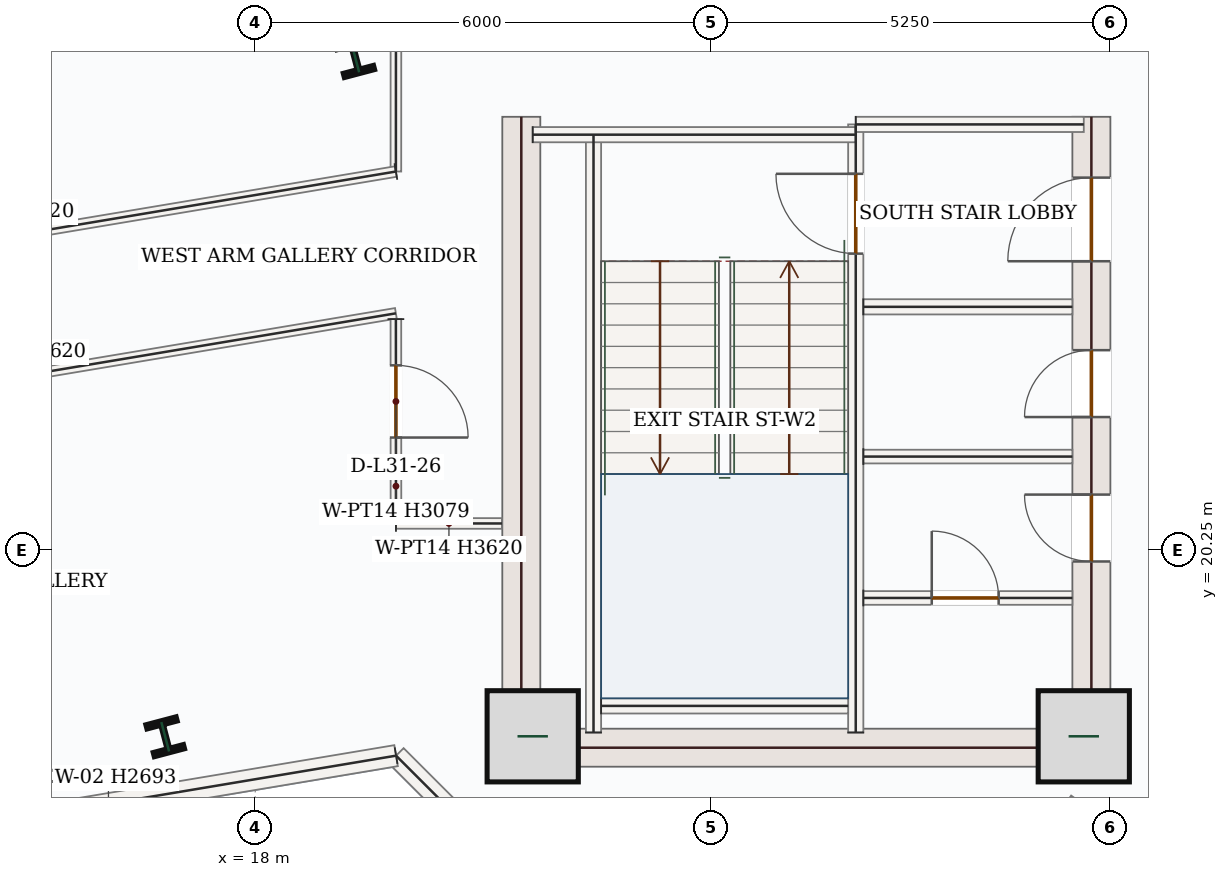
"""IFC4 building model, lengths in metres.
Left out: names, types, materials, properties, quantities, classifications, styles, units other than length and angle.
Written with IfcOpenShell. Run it as: python <this file> out.ifc"""

import sys

from ifc_helpers import new_model, si_unit, direction, frame, frame_2d, origin, origin_2d, place, context, subcontext, project, spatial, rectangle, i_section, extrude, source, transform, mapped, element, fill, save


model = new_model("IFC4")
c1 = context("Model", 3, precision=1e-05, world=origin(), true_north=direction((0.0, 1.0)))
c2 = subcontext(c1, "Body", "Model", "MODEL_VIEW")
j1 = project(units=[si_unit("LENGTHUNIT", "METRE"), si_unit("PLANEANGLEUNIT", "RADIAN")], contexts=[c1])
p1 = place(None, origin())
s1 = spatial("IfcSite", under=j1, at=p1, CompositionType="ELEMENT")
p2 = place(p1, origin())
s2 = spatial("IfcBuilding", under=s1, at=p2, CompositionType="ELEMENT")
p3 = place(p2, frame((0.0, 0.0, 139.5)))
s3 = spatial("IfcBuildingStorey", under=s2, at=p3, CompositionType="ELEMENT", Elevation=139.5)
m1 = source(origin(), c2, "Body", "SweptSolid", [
    extrude(rectangle(XDim=8.55, YDim=0.5, at=frame_2d((4.275, 0.0))), origin(), (0.0, 0.0, 1.0), 3.62),
])
p4 = place(p3, frame((21.5, 17.4, 0.0), z_axis=(0.0, 0.0, 1.0), x_axis=(0.0, 1.0, 0.0)))
e1 = element("IfcWall", 1, at=p4, inside=s3, PredefinedType="SHEAR", context=c2, shape_type="MappedRepresentation", body=[
    mapped(m1, transform((0.0, 0.0, 0.0), x_axis=(1.0, 0.0, 0.0), y_axis=(0.0, 1.0, 0.0), z_axis=(0.0, 0.0, 1.0), scale=1.0)),
])
p5 = place(p3, frame((29.0, 17.4, 0.0), z_axis=(0.0, 0.0, 1.0), x_axis=(0.0, 1.0, 0.0)))
e2 = element("IfcWall", 2, at=p5, inside=s3, PredefinedType="SHEAR", context=c2, shape_type="SweptSolid", body=[
    extrude(rectangle(XDim=8.55, YDim=0.5, at=frame_2d((4.275, 0.0))), origin(), (0.0, 0.0, 1.0), 3.62),
])
p6 = place(p5, frame((6.65, 0.0, 0.0)))
e3 = element("IfcOpeningElement", 3, at=p6, cuts=e2, PredefinedType="OPENING", context=c2, shape_type="SweptSolid", body=[
    extrude(rectangle(XDim=1.1, YDim=2.2, at=frame_2d((0.55, 1.1))), frame((0.0, 0.26, 0.0), z_axis=(0.0, -1.0, 0.0), x_axis=(1.0, 0.0, 0.0)), (0.0, 0.0, 1.0), 0.52),
])
p7 = place(p5, frame((2.7, 0.0, 0.0)))
e4 = element("IfcOpeningElement", 4, at=p7, cuts=e2, PredefinedType="OPENING", context=c2, shape_type="SweptSolid", body=[
    extrude(rectangle(XDim=0.88, YDim=2.1, at=frame_2d((0.44, 1.05))), frame((0.0, 0.26, 0.0), z_axis=(0.0, -1.0, 0.0), x_axis=(1.0, 0.0, 0.0)), (0.0, 0.0, 1.0), 0.52),
])
p8 = place(p5, frame((4.6, 0.0, 0.0)))
e5 = element("IfcOpeningElement", 5, at=p8, cuts=e2, PredefinedType="OPENING", context=c2, shape_type="SweptSolid", body=[
    extrude(rectangle(XDim=0.88, YDim=2.1, at=frame_2d((0.44, 1.05))), frame((0.0, 0.26, 0.0), z_axis=(0.0, -1.0, 0.0), x_axis=(1.0, 0.0, 0.0)), (0.0, 0.0, 1.0), 0.52),
])
m2 = source(origin(), c2, "Body", "SweptSolid", [
    extrude(rectangle(XDim=7.0, YDim=0.5, at=frame_2d((3.5, 0.0))), origin(), (0.0, 0.0, 1.0), 3.62),
])
p9 = place(p3, frame((21.75, 17.65, 0.0), z_axis=(0.0, 0.0, 1.0), x_axis=(1.0, 0.0, 0.0)))
e6 = element("IfcWall", 6, at=p9, inside=s3, PredefinedType="SHEAR", context=c2, shape_type="MappedRepresentation", body=[
    mapped(m2, transform((0.0, 0.0, 0.0), x_axis=(1.0, 0.0, 0.0), y_axis=(0.0, 1.0, 0.0), z_axis=(0.0, 0.0, 1.0), scale=1.0)),
])
m3 = source(origin(), c2, "Body", "SweptSolid", [
    extrude(rectangle(XDim=1.2, YDim=1.2, at=origin_2d()), origin(), (0.0, 0.0, 1.0), 3.9),
])
for number, where, z_axis, x_axis in (
    (7, (21.65, 17.8, 0.0), (0.0, 0.0, 1.0), (1.0, 0.0, 0.0)),
    (8, (28.9, 17.8, 0.0), (0.0, 0.0, 1.0), (1.0, 0.0, 0.0)),
):
    element("IfcColumn", number, at=place(p3, frame(where, z_axis=z_axis, x_axis=x_axis)), inside=s3, PredefinedType="COLUMN", context=c2, shape_type="MappedRepresentation", body=[
        mapped(m3, transform((0.0, 0.0, 0.0), x_axis=(1.0, 0.0, 0.0), y_axis=(0.0, 1.0, 0.0), z_axis=(0.0, 0.0, 1.0), scale=1.0)),
    ])
m4 = source(origin(), c2, "Body", "SweptSolid", [
    extrude(i_section(OverallWidth=0.412, OverallDepth=0.435, WebThickness=0.036, FlangeThickness=0.057, FilletRadius=0.018, at=origin_2d()), origin(), (0.0, 0.0, 1.0), 3.9),
])
for number, where, z_axis, x_axis in (
    (9, (19.316, 26.729, 0.0), (0.0, 0.0, 1.0), (0.967, 0.255, 0.0)),
    (10, (16.815, 17.794, 0.0), (0.0, 0.0, 1.0), (0.967, 0.255, 0.0)),
):
    element("IfcColumn", number, at=place(p3, frame(where, z_axis=z_axis, x_axis=x_axis)), inside=s3, PredefinedType="COLUMN", context=c2, shape_type="MappedRepresentation", body=[
        mapped(m4, transform((0.0, 0.0, 0.0), x_axis=(1.0, 0.0, 0.0), y_axis=(0.0, 1.0, 0.0), z_axis=(0.0, 0.0, 1.0), scale=1.0)),
    ])
p10 = place(p3, frame((22.658, 14.74, 0.0), z_axis=(0.0, 0.0, 1.0), x_axis=(-0.707076011326, 0.707137549708, 0.0)))
e11 = element("IfcWall", 11, at=p10, inside=s3, PredefinedType="SOLIDWALL", context=c2, shape_type="SweptSolid", body=[
    extrude(rectangle(XDim=3.967, YDim=0.28, at=frame_2d((1.984, 0.0))), origin(), (0.0, 0.0, 1.0), 3.62),
])
p11 = place(p10, frame((1.084, 0.0, 0.85)))
e12 = element("IfcOpeningElement", 12, at=p11, cuts=e11, PredefinedType="OPENING", context=c2, shape_type="SweptSolid", body=[
    extrude(rectangle(XDim=1.8, YDim=1.75, at=frame_2d((0.9, 0.875))), frame((0.0, 0.15, 0.0), z_axis=(0.0, -1.0, 0.0), x_axis=(1.0, 0.0, 0.0)), (0.0, 0.0, 1.0), 0.3),
])
m5 = source(origin(), c2, "Body", "SweptSolid", [
    extrude(rectangle(XDim=7.674, YDim=0.28, at=frame_2d((3.837, 0.0))), origin(), (0.0, 0.0, 1.0), 2.693),
])
p12 = place(p3, frame((19.853, 17.545, 0.0), z_axis=(0.0, 0.0, 1.0), x_axis=(-0.986284504747, -0.165054159886, 0.0)))
e13 = element("IfcWall", 13, at=p12, inside=s3, PredefinedType="SOLIDWALL", context=c2, shape_type="MappedRepresentation", body=[
    mapped(m5, transform((0.0, 0.0, 0.0), x_axis=(1.0, 0.0, 0.0), y_axis=(0.0, 1.0, 0.0), z_axis=(0.0, 0.0, 1.0), scale=1.0)),
])
m6 = source(origin(), c2, "Body", "SweptSolid", [
    extrude(rectangle(XDim=7.87, YDim=0.2, at=frame_2d((3.935, 0.0))), origin(), (0.0, 0.0, 1.0), 3.62),
])
p13 = place(p3, frame((22.45, 17.85, 0.0), z_axis=(0.0, 0.0, 1.0), x_axis=(0.0, 1.0, 0.0)))
e14 = element("IfcWall", 14, at=p13, inside=s3, PredefinedType="SOLIDWALL", context=c2, shape_type="MappedRepresentation", body=[
    mapped(m6, transform((0.0, 0.0, 0.0), x_axis=(1.0, 0.0, 0.0), y_axis=(0.0, 1.0, 0.0), z_axis=(0.0, 0.0, 1.0), scale=1.0)),
])
p14 = place(p3, frame((25.9, 17.85, 0.0), z_axis=(0.0, 0.0, 1.0), x_axis=(0.0, 1.0, 0.0)))
e15 = element("IfcWall", 15, at=p14, inside=s3, PredefinedType="SOLIDWALL", context=c2, shape_type="SweptSolid", body=[
    extrude(rectangle(XDim=8.0, YDim=0.2, at=frame_2d((4.0, 0.0))), origin(), (0.0, 0.0, 1.0), 3.62),
])
p15 = place(p14, frame((6.3, 0.0, 0.0)))
e16 = element("IfcOpeningElement", 16, at=p15, cuts=e15, PredefinedType="OPENING", context=c2, shape_type="SweptSolid", body=[
    extrude(rectangle(XDim=1.05, YDim=2.15, at=frame_2d((0.525, 1.075))), frame((0.0, 0.11, 0.0), z_axis=(0.0, -1.0, 0.0), x_axis=(1.0, 0.0, 0.0)), (0.0, 0.0, 1.0), 0.22),
])
m7 = source(origin(), c2, "Body", "SweptSolid", [
    extrude(rectangle(XDim=4.25, YDim=0.2, at=frame_2d((2.125, 0.0))), origin(), (0.0, 0.0, 1.0), 3.62),
])
p16 = place(p3, frame((21.65, 25.715, 0.0), z_axis=(0.0, 0.0, 1.0), x_axis=(1.0, 0.0, 0.0)))
e17 = element("IfcWall", 17, at=p16, inside=s3, PredefinedType="SOLIDWALL", context=c2, shape_type="MappedRepresentation", body=[
    mapped(m7, transform((0.0, 0.0, 0.0), x_axis=(1.0, 0.0, 0.0), y_axis=(0.0, 1.0, 0.0), z_axis=(0.0, 0.0, 1.0), scale=1.0)),
])
m8 = source(origin(), c2, "Body", "SweptSolid", [
    extrude(rectangle(XDim=3.0, YDim=0.2, at=frame_2d((1.5, 0.0))), origin(), (0.0, 0.0, 1.0), 3.62),
])
p17 = place(p3, frame((25.9, 25.85, 0.0), z_axis=(0.0, 0.0, 1.0), x_axis=(1.0, 0.0, 0.0)))
e18 = element("IfcWall", 18, at=p17, inside=s3, PredefinedType="SOLIDWALL", context=c2, shape_type="MappedRepresentation", body=[
    mapped(m8, transform((0.0, 0.0, 0.0), x_axis=(1.0, 0.0, 0.0), y_axis=(0.0, 1.0, 0.0), z_axis=(0.0, 0.0, 1.0), scale=1.0)),
])
m9 = source(origin(), c2, "Body", "SweptSolid", [
    extrude(rectangle(XDim=3.25, YDim=0.2, at=frame_2d((1.625, 0.0))), origin(), (0.0, 0.0, 1.0), 3.62),
])
p18 = place(p3, frame((22.55, 18.2, 0.0), z_axis=(0.0, 0.0, 1.0), x_axis=(1.0, 0.0, 0.0)))
e19 = element("IfcWall", 19, at=p18, inside=s3, PredefinedType="SOLIDWALL", context=c2, shape_type="MappedRepresentation", body=[
    mapped(m9, transform((0.0, 0.0, 0.0), x_axis=(1.0, 0.0, 0.0), y_axis=(0.0, 1.0, 0.0), z_axis=(0.0, 0.0, 1.0), scale=1.0)),
])
m10 = source(origin(), c2, "Body", "SweptSolid", [
    extrude(rectangle(XDim=2.75, YDim=0.2, at=frame_2d((1.375, 0.0))), origin(), (0.0, 0.0, 1.0), 3.62),
])
p19 = place(p3, frame((26.0, 23.45, 0.0), z_axis=(0.0, 0.0, 1.0), x_axis=(1.0, 0.0, 0.0)))
e20 = element("IfcWall", 20, at=p19, inside=s3, PredefinedType="SOLIDWALL", context=c2, shape_type="MappedRepresentation", body=[
    mapped(m10, transform((0.0, 0.0, 0.0), x_axis=(1.0, 0.0, 0.0), y_axis=(0.0, 1.0, 0.0), z_axis=(0.0, 0.0, 1.0), scale=1.0)),
])
p20 = place(p3, frame((26.0, 19.62, 0.0), z_axis=(0.0, 0.0, 1.0), x_axis=(1.0, 0.0, 0.0)))
e21 = element("IfcWall", 21, at=p20, inside=s3, PredefinedType="PARTITIONING", context=c2, shape_type="SweptSolid", body=[
    extrude(rectangle(XDim=2.75, YDim=0.18, at=frame_2d((1.375, 0.0))), origin(), (0.0, 0.0, 1.0), 3.62),
])
p21 = place(p20, frame((0.9, 0.0, 0.0)))
e22 = element("IfcOpeningElement", 22, at=p21, cuts=e21, PredefinedType="OPENING", context=c2, shape_type="SweptSolid", body=[
    extrude(rectangle(XDim=0.88, YDim=2.1, at=frame_2d((0.44, 1.05))), frame((0.0, 0.1, 0.0), z_axis=(0.0, -1.0, 0.0), x_axis=(1.0, 0.0, 0.0)), (0.0, 0.0, 1.0), 0.2),
])
m11 = source(origin(), c2, "Body", "SweptSolid", [
    extrude(rectangle(XDim=2.75, YDim=0.18, at=frame_2d((1.375, 0.0))), origin(), (0.0, 0.0, 1.0), 3.62),
])
p22 = place(p3, frame((26.0, 21.48, 0.0), z_axis=(0.0, 0.0, 1.0), x_axis=(1.0, 0.0, 0.0)))
e23 = element("IfcWall", 23, at=p22, inside=s3, PredefinedType="PARTITIONING", context=c2, shape_type="MappedRepresentation", body=[
    mapped(m11, transform((0.0, 0.0, 0.0), x_axis=(1.0, 0.0, 0.0), y_axis=(0.0, 1.0, 0.0), z_axis=(0.0, 0.0, 1.0), scale=1.0)),
])
m12 = source(origin(), c2, "Body", "SweptSolid", [
    extrude(rectangle(XDim=2.565, YDim=0.14, at=frame_2d((1.282, 0.0))), origin(), (0.0, 0.0, 1.0), 3.62),
])
p23 = place(p3, frame((27.311, 14.885, 0.0), z_axis=(0.0, 0.0, 1.0), x_axis=(0.576926084836, 0.816796359343, 0.0)))
e24 = element("IfcWall", 24, at=p23, inside=s3, PredefinedType="PARTITIONING", context=c2, shape_type="MappedRepresentation", body=[
    mapped(m12, transform((0.0, 0.0, 0.0), x_axis=(1.0, 0.0, 0.0), y_axis=(0.0, 1.0, 0.0), z_axis=(0.0, 0.0, 1.0), scale=1.0)),
])
p24 = place(p3, frame((19.854, 33.399, 0.0), z_axis=(0.0, 0.0, 1.0), x_axis=(-0.000448283031, -0.999999899521, 0.0)))
e25 = element("IfcWall", 25, at=p24, inside=s3, PredefinedType="PARTITIONING", context=c2, shape_type="SweptSolid", body=[
    extrude(rectangle(XDim=8.169, YDim=0.14, at=frame_2d((4.084, 0.0))), origin(), (0.0, 0.0, 1.0), 2.693),
])
p25 = place(p24, frame((2.527, 0.0, 0.0)))
e26 = element("IfcOpeningElement", 26, at=p25, cuts=e25, PredefinedType="OPENING", context=c2, shape_type="SweptSolid", body=[
    extrude(rectangle(XDim=0.95, YDim=2.15, at=frame_2d((0.475, 1.075))), frame((0.0, 0.08, 0.0), z_axis=(0.0, -1.0, 0.0), x_axis=(1.0, 0.0, 0.0)), (0.0, 0.0, 1.0), 0.16),
])
m13 = source(origin(), c2, "Body", "SweptSolid", [
    extrude(rectangle(XDim=10.544, YDim=0.14, at=frame_2d((5.272, 0.0))), origin(), (0.0, 0.0, 1.0), 3.62),
])
p26 = place(p3, frame((19.85, 25.23, 0.0), z_axis=(0.0, 0.0, 1.0), x_axis=(-0.986287336963, -0.165037235031, 0.0)))
e27 = element("IfcWall", 27, at=p26, inside=s3, PredefinedType="PARTITIONING", context=c2, shape_type="MappedRepresentation", body=[
    mapped(m13, transform((0.0, 0.0, 0.0), x_axis=(1.0, 0.0, 0.0), y_axis=(0.0, 1.0, 0.0), z_axis=(0.0, 0.0, 1.0), scale=1.0)),
])
m14 = source(origin(), c2, "Body", "SweptSolid", [
    extrude(rectangle(XDim=10.237, YDim=0.14, at=frame_2d((5.118, 0.0))), origin(), (0.0, 0.0, 1.0), 3.62),
])
p27 = place(p3, frame((9.754, 21.675, 0.0), z_axis=(0.0, 0.0, 1.0), x_axis=(0.986290594835, 0.165017764319, 0.0)))
e28 = element("IfcWall", 28, at=p27, inside=s3, PredefinedType="PARTITIONING", context=c2, shape_type="MappedRepresentation", body=[
    mapped(m14, transform((0.0, 0.0, 0.0), x_axis=(1.0, 0.0, 0.0), y_axis=(0.0, 1.0, 0.0), z_axis=(0.0, 0.0, 1.0), scale=1.0)),
])
p28 = place(p3, frame((19.85, 23.289, 0.0), z_axis=(0.0, 0.0, 1.0), x_axis=(0.000363372069, -0.99999993398, 0.0)))
e29 = element("IfcWall", 29, at=p28, inside=s3, PredefinedType="PARTITIONING", context=c2, shape_type="SweptSolid", body=[
    extrude(rectangle(XDim=2.688, YDim=0.14, at=frame_2d((1.344, 0.0))), origin(), (0.0, 0.0, 1.0), 3.079),
])
p29 = place(p28, frame((0.608, 0.0, 0.0)))
e30 = element("IfcOpeningElement", 30, at=p29, cuts=e29, PredefinedType="OPENING", context=c2, shape_type="SweptSolid", body=[
    extrude(rectangle(XDim=0.95, YDim=2.15, at=frame_2d((0.475, 1.075))), frame((0.0, 0.08, 0.0), z_axis=(0.0, -1.0, 0.0), x_axis=(1.0, 0.0, 0.0)), (0.0, 0.0, 1.0), 0.16),
])
m15 = source(origin(), c2, "Body", "SweptSolid", [
    extrude(rectangle(XDim=1.394, YDim=0.14, at=frame_2d((0.697, 0.0))), origin(), (0.0, 0.0, 1.0), 3.62),
])
p30 = place(p3, frame((19.851, 20.601, 0.0), z_axis=(0.0, 0.0, 1.0), x_axis=(0.999999754632, -0.000700525222, 0.0)))
e31 = element("IfcWall", 31, at=p30, inside=s3, PredefinedType="PARTITIONING", context=c2, shape_type="MappedRepresentation", body=[
    mapped(m15, transform((0.0, 0.0, 0.0), x_axis=(1.0, 0.0, 0.0), y_axis=(0.0, 1.0, 0.0), z_axis=(0.0, 0.0, 1.0), scale=1.0)),
])
m16 = source(origin(), c2, "Body", "SweptSolid", [
    extrude(rectangle(XDim=1.05, YDim=2.15, at=frame_2d((0.525, 1.075))), frame((0.0, 0.025, 0.0), z_axis=(0.0, -1.0, 0.0), x_axis=(1.0, 0.0, 0.0)), (0.0, 0.0, 1.0), 0.05),
])
p31 = place(p15, origin())
e32 = element("IfcDoor", 32, at=p31, inside=s3, OperationType="SINGLE_SWING_RIGHT", PredefinedType="DOOR", context=c2, shape_type="MappedRepresentation", body=[
    mapped(m16, transform((0.0, 0.0, 0.0), x_axis=(1.0, 0.0, 0.0), y_axis=(0.0, 1.0, 0.0), z_axis=(0.0, 0.0, 1.0), scale=1.0)),
])
fill(e16, e32)
m17 = source(origin(), c2, "Body", "SweptSolid", [
    extrude(rectangle(XDim=1.1, YDim=2.2, at=frame_2d((0.55, 1.1))), frame((0.0, 0.025, 0.0), z_axis=(0.0, -1.0, 0.0), x_axis=(1.0, 0.0, 0.0)), (0.0, 0.0, 1.0), 0.05),
])
p32 = place(p6, origin())
e33 = element("IfcDoor", 33, at=p32, inside=s3, OperationType="SINGLE_SWING_LEFT", PredefinedType="DOOR", context=c2, shape_type="MappedRepresentation", body=[
    mapped(m17, transform((0.0, 0.0, 0.0), x_axis=(1.0, 0.0, 0.0), y_axis=(0.0, 1.0, 0.0), z_axis=(0.0, 0.0, 1.0), scale=1.0)),
])
fill(e3, e33)
m18 = source(origin(), c2, "Body", "SweptSolid", [
    extrude(rectangle(XDim=0.88, YDim=2.1, at=frame_2d((0.44, 1.05))), frame((0.0, 0.025, 0.0), z_axis=(0.0, -1.0, 0.0), x_axis=(1.0, 0.0, 0.0)), (0.0, 0.0, 1.0), 0.05),
])
p33 = place(p21, origin())
e34 = element("IfcDoor", 34, at=p33, inside=s3, OperationType="SINGLE_SWING_LEFT", PredefinedType="DOOR", context=c2, shape_type="MappedRepresentation", body=[
    mapped(m18, transform((0.0, 0.0, 0.0), x_axis=(1.0, 0.0, 0.0), y_axis=(0.0, 1.0, 0.0), z_axis=(0.0, 0.0, 1.0), scale=1.0)),
])
fill(e22, e34)
p34 = place(p7, origin())
e35 = element("IfcDoor", 35, at=p34, inside=s3, OperationType="SINGLE_SWING_RIGHT", PredefinedType="DOOR", context=c2, shape_type="MappedRepresentation", body=[
    mapped(m18, transform((0.0, 0.0, 0.0), x_axis=(1.0, 0.0, 0.0), y_axis=(0.0, 1.0, 0.0), z_axis=(0.0, 0.0, 1.0), scale=1.0)),
])
fill(e4, e35)
p35 = place(p8, origin())
e36 = element("IfcDoor", 36, at=p35, inside=s3, OperationType="SINGLE_SWING_LEFT", PredefinedType="DOOR", context=c2, shape_type="MappedRepresentation", body=[
    mapped(m18, transform((0.0, 0.0, 0.0), x_axis=(1.0, 0.0, 0.0), y_axis=(0.0, 1.0, 0.0), z_axis=(0.0, 0.0, 1.0), scale=1.0)),
])
fill(e5, e36)
m19 = source(origin(), c2, "Body", "SweptSolid", [
    extrude(rectangle(XDim=0.95, YDim=2.15, at=frame_2d((0.475, 1.075))), frame((0.0, 0.025, 0.0), z_axis=(0.0, -1.0, 0.0), x_axis=(1.0, 0.0, 0.0)), (0.0, 0.0, 1.0), 0.05),
])
p36 = place(p29, origin())
e37 = element("IfcDoor", 37, at=p36, inside=s3, OperationType="SINGLE_SWING_RIGHT", PredefinedType="DOOR", context=c2, shape_type="MappedRepresentation", body=[
    mapped(m19, transform((0.0, 0.0, 0.0), x_axis=(1.0, 0.0, 0.0), y_axis=(0.0, 1.0, 0.0), z_axis=(0.0, 0.0, 1.0), scale=1.0)),
])
fill(e30, e37)
save(model, sys.argv[1])
